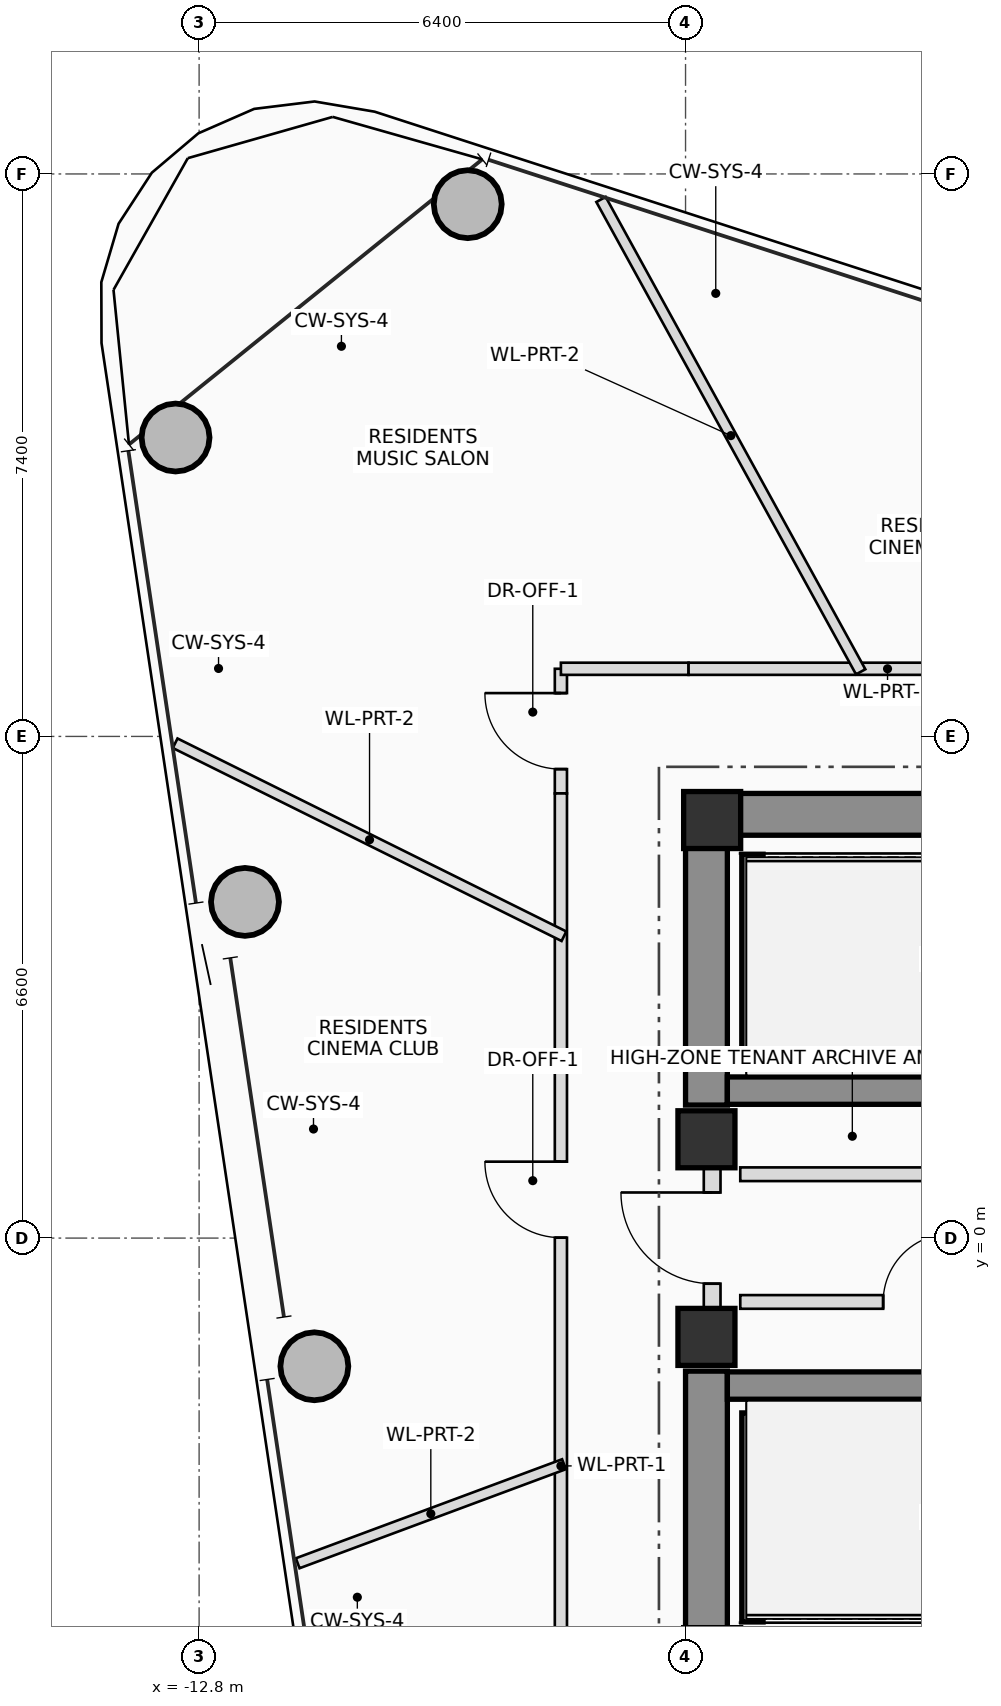
"""IFC4 building model, lengths in metres.
Left out: names, types, materials, properties, quantities, classifications, styles, units other than length and angle.
Written with IfcOpenShell. Run it as: python <this file> out.ifc"""

import sys

from ifc_helpers import new_model, si_unit, direction, frame, frame_2d, origin, origin_2d, place, context, subcontext, project, spatial, rectangle, hollow_circle, extrude, source, transform, mapped, element, fill, save


model = new_model("IFC4")
c1 = context("Model", 3, precision=1e-05, world=origin(), true_north=direction((0.0, 1.0)))
c2 = subcontext(c1, "Body", "Model", "MODEL_VIEW")
j1 = project(units=[si_unit("LENGTHUNIT", "METRE"), si_unit("PLANEANGLEUNIT", "RADIAN")], contexts=[c1])
p1 = place(None, origin())
s1 = spatial("IfcSite", under=j1, at=p1, CompositionType="ELEMENT")
p2 = place(p1, origin())
s2 = spatial("IfcBuilding", under=s1, at=p2, CompositionType="ELEMENT")
p3 = place(p2, frame((0.0, 0.0, 274.55)))
s3 = spatial("IfcBuildingStorey", under=s2, at=p3, CompositionType="ELEMENT", Elevation=274.55)
m1 = source(origin(), c2, "Body", "SweptSolid", [
    extrude(rectangle(XDim=0.75, YDim=0.75, at=origin_2d()), origin(), (0.0, 0.0, 1.0), 3.4),
])
p4 = place(p3, frame((-6.05, 5.5, 0.0), z_axis=(0.0, 0.0, 1.0), x_axis=(1.0, 0.0, 0.0)))
e1 = element("IfcColumn", 1, at=p4, inside=s3, PredefinedType="COLUMN", context=c2, shape_type="MappedRepresentation", body=[
    mapped(m1, transform((0.0, 0.0, 0.0), scale=1.0)),
])
p5 = place(p3, frame((-6.4, 5.575, 0.0), z_axis=(0.0, 0.0, 1.0), x_axis=(1.0, 0.0, 0.0)))
e2 = element("IfcWall", 2, at=p5, inside=s3, PredefinedType="SHEAR", context=c2, shape_type="SweptSolid", body=[
    extrude(rectangle(XDim=12.8, YDim=0.55, at=frame_2d((6.4, 0.0))), origin(), (0.0, 0.0, 1.0), 3.4),
])
p6 = place(p5, frame((8.6, 0.0, 0.0)))
e3 = element("IfcOpeningElement", 3, at=p6, cuts=e2, PredefinedType="OPENING", context=c2, shape_type="SweptSolid", body=[
    extrude(rectangle(XDim=1.2, YDim=2.2, at=frame_2d((0.6, 1.1))), frame((0.0, 0.285, 0.0), z_axis=(0.0, -1.0, 0.0), x_axis=(1.0, 0.0, 0.0)), (0.0, 0.0, 1.0), 0.57),
])
for number, where, z_axis, x_axis in (
    (4, (-6.125, -5.3, 0.0), (0.0, 0.0, 1.0), (0.0, 1.0, 0.0)),
    (5, (-6.125, 1.75, 0.0), (0.0, 0.0, 1.0), (0.0, 1.0, 0.0)),
):
    element("IfcWall", number, at=place(p3, frame(where, z_axis=z_axis, x_axis=x_axis)), inside=s3, PredefinedType="SHEAR", context=c2, shape_type="SweptSolid", body=[
        extrude(rectangle(XDim=3.55, YDim=0.55, at=frame_2d((1.775, 0.0))), origin(), (0.0, 0.0, 1.0), 3.4),
    ])
for number, where, z_axis, x_axis in (
    (6, (-5.85, 1.94, 0.0), (0.0, 0.0, 1.0), (1.0, 0.0, 0.0)),
    (7, (-5.85, -1.94, 0.0), (0.0, 0.0, 1.0), (1.0, 0.0, 0.0)),
):
    element("IfcWall", number, at=place(p3, frame(where, z_axis=z_axis, x_axis=x_axis)), inside=s3, PredefinedType="SHEAR", context=c2, shape_type="SweptSolid", body=[
        extrude(rectangle(XDim=11.7, YDim=0.36, at=frame_2d((5.85, 0.0))), origin(), (0.0, 0.0, 1.0), 3.4),
    ])
for number, where, z_axis, x_axis in (
    (8, (-5.52, 2.3, 0.0), (0.0, 0.0, 1.0), (0.0, 1.0, 0.0)),
    (9, (-5.52, -5.05, 0.0), (0.0, 0.0, 1.0), (0.0, 1.0, 0.0)),
):
    element("IfcWall", number, at=place(p3, frame(where, z_axis=z_axis, x_axis=x_axis)), inside=s3, PredefinedType="SHEAR", context=c2, shape_type="SweptSolid", body=[
        extrude(rectangle(XDim=2.75, YDim=0.28, at=frame_2d((1.375, 0.0))), origin(), (0.0, 0.0, 1.0), 3.4),
    ])
for number, where, z_axis, x_axis in (
    (10, (-6.125, -1.3, 0.0), (0.0, 0.0, 1.0), (1.0, 0.0, 0.0)),
    (11, (-6.125, 1.3, 0.0), (0.0, 0.0, 1.0), (1.0, 0.0, 0.0)),
):
    element("IfcColumn", number, at=place(p3, frame(where, z_axis=z_axis, x_axis=x_axis)), inside=s3, PredefinedType="COLUMN", context=c2, shape_type="MappedRepresentation", body=[
        mapped(m1, transform((0.0, 0.0, 0.0), scale=1.0)),
    ])
m2 = source(origin(), c2, "Body", "SweptSolid", [
    extrude(hollow_circle(Radius=0.45, WallThickness=0.032, at=origin_2d()), origin(), (0.0, 0.0, 1.0), 3.4),
])
for number, where, z_axis, x_axis in (
    (12, (-9.266, 13.602, 0.0), (0.0, 0.0, 1.0), (1.0, 0.0, 0.0)),
    (13, (-13.11, 10.532, 0.0), (0.0, 0.0, 1.0), (1.0, 0.0, 0.0)),
    (14, (-12.197, 4.423, 0.0), (0.0, 0.0, 1.0), (1.0, 0.0, 0.0)),
    (15, (-11.284, -1.686, 0.0), (0.0, 0.0, 1.0), (1.0, 0.0, 0.0)),
):
    element("IfcColumn", number, at=place(p3, frame(where, z_axis=z_axis, x_axis=x_axis)), inside=s3, PredefinedType="COLUMN", context=c2, shape_type="MappedRepresentation", body=[
        mapped(m2, transform((0.0, 0.0, 0.0), scale=1.0)),
    ])
p7 = place(p3, frame((-6.05, -0.95, 0.0), z_axis=(0.0, 0.0, 1.0), x_axis=(0.0, 1.0, 0.0)))
e16 = element("IfcWall", 16, at=p7, inside=s3, PredefinedType="PLUMBINGWALL", context=c2, shape_type="SweptSolid", body=[
    extrude(rectangle(XDim=1.9, YDim=0.22, at=frame_2d((0.95, 0.0))), origin(), (0.0, 0.0, 1.0), 2.18),
])
p8 = place(p7, frame((0.35, 0.0, 0.0)))
e17 = element("IfcOpeningElement", 17, at=p8, cuts=e16, PredefinedType="OPENING", context=c2, shape_type="SweptSolid", body=[
    extrude(rectangle(XDim=1.2, YDim=2.2, at=frame_2d((0.6, 1.1))), frame((0.0, 0.12, 0.0), z_axis=(0.0, -1.0, 0.0), x_axis=(1.0, 0.0, 0.0)), (0.0, 0.0, 1.0), 0.24),
])
p9 = place(p3, frame((-5.68, 0.84, 0.0), z_axis=(0.0, 0.0, 1.0), x_axis=(1.0, 0.0, 0.0)))
e18 = element("IfcWall", 18, at=p9, inside=s3, PredefinedType="PLUMBINGWALL", context=c2, shape_type="SweptSolid", body=[
    extrude(rectangle(XDim=11.33, YDim=0.18, at=frame_2d((5.665, 0.0))), origin(), (0.0, 0.0, 1.0), 3.2),
])
p10 = place(p9, frame((3.13, 0.0, 0.0)))
e19 = element("IfcOpeningElement", 19, at=p10, cuts=e18, PredefinedType="OPENING", context=c2, shape_type="SweptSolid", body=[
    extrude(rectangle(XDim=0.9, YDim=2.05, at=frame_2d((0.45, 1.025))), frame((0.0, 0.1, 0.0), z_axis=(0.0, -1.0, 0.0), x_axis=(1.0, 0.0, 0.0)), (0.0, 0.0, 1.0), 0.2),
])
p11 = place(p9, frame((7.33, 0.0, 0.0)))
e20 = element("IfcOpeningElement", 20, at=p11, cuts=e18, PredefinedType="OPENING", context=c2, shape_type="SweptSolid", body=[
    extrude(rectangle(XDim=1.1, YDim=2.2, at=frame_2d((0.55, 1.1))), frame((0.0, 0.1, 0.0), z_axis=(0.0, -1.0, 0.0), x_axis=(1.0, 0.0, 0.0)), (0.0, 0.0, 1.0), 0.2),
])
p12 = place(p9, frame((8.83, 0.0, 0.0)))
e21 = element("IfcOpeningElement", 21, at=p12, cuts=e18, PredefinedType="OPENING", context=c2, shape_type="SweptSolid", body=[
    extrude(rectangle(XDim=1.1, YDim=2.2, at=frame_2d((0.55, 1.1))), frame((0.0, 0.1, 0.0), z_axis=(0.0, -1.0, 0.0), x_axis=(1.0, 0.0, 0.0)), (0.0, 0.0, 1.0), 0.2),
])
p13 = place(p3, frame((-5.68, -0.84, 0.0), z_axis=(0.0, 0.0, 1.0), x_axis=(1.0, 0.0, 0.0)))
e22 = element("IfcWall", 22, at=p13, inside=s3, PredefinedType="PLUMBINGWALL", context=c2, shape_type="SweptSolid", body=[
    extrude(rectangle(XDim=10.22, YDim=0.18, at=frame_2d((5.11, 0.0))), origin(), (0.0, 0.0, 1.0), 3.2),
])
p14 = place(p13, frame((1.88, 0.0, 0.0)))
e23 = element("IfcOpeningElement", 23, at=p14, cuts=e22, PredefinedType="OPENING", context=c2, shape_type="SweptSolid", body=[
    extrude(rectangle(XDim=0.9, YDim=2.05, at=frame_2d((0.45, 1.025))), frame((0.0, 0.1, 0.0), z_axis=(0.0, -1.0, 0.0), x_axis=(1.0, 0.0, 0.0)), (0.0, 0.0, 1.0), 0.2),
])
p15 = place(p13, frame((5.35, 0.0, 0.0)))
e24 = element("IfcOpeningElement", 24, at=p15, cuts=e22, PredefinedType="OPENING", context=c2, shape_type="SweptSolid", body=[
    extrude(rectangle(XDim=0.9, YDim=2.05, at=frame_2d((0.45, 1.025))), frame((0.0, 0.1, 0.0), z_axis=(0.0, -1.0, 0.0), x_axis=(1.0, 0.0, 0.0)), (0.0, 0.0, 1.0), 0.2),
])
p16 = place(p13, frame((7.33, 0.0, 0.0)))
e25 = element("IfcOpeningElement", 25, at=p16, cuts=e22, PredefinedType="OPENING", context=c2, shape_type="SweptSolid", body=[
    extrude(rectangle(XDim=1.1, YDim=2.2, at=frame_2d((0.55, 1.1))), frame((0.0, 0.1, 0.0), z_axis=(0.0, -1.0, 0.0), x_axis=(1.0, 0.0, 0.0)), (0.0, 0.0, 1.0), 0.2),
])
p17 = place(p13, frame((9.02, 0.0, 0.0)))
e26 = element("IfcOpeningElement", 26, at=p17, cuts=e22, PredefinedType="OPENING", context=c2, shape_type="SweptSolid", body=[
    extrude(rectangle(XDim=0.9, YDim=2.05, at=frame_2d((0.45, 1.025))), frame((0.0, 0.1, 0.0), z_axis=(0.0, -1.0, 0.0), x_axis=(1.0, 0.0, 0.0)), (0.0, 0.0, 1.0), 0.2),
])
p18 = place(p3, frame((-8.04, 5.85, 0.0), z_axis=(0.0, 0.0, 1.0), x_axis=(0.0, 1.0, 0.0)))
e27 = element("IfcWall", 27, at=p18, inside=s3, PredefinedType="PARTITIONING", context=c2, shape_type="SweptSolid", body=[
    extrude(rectangle(XDim=1.64, YDim=0.16, at=frame_2d((0.82, 0.0))), origin(), (0.0, 0.0, 1.0), 2.605),
])
p19 = place(p18, frame((0.32, 0.0, 0.0)))
e28 = element("IfcOpeningElement", 28, at=p19, cuts=e27, PredefinedType="OPENING", context=c2, shape_type="SweptSolid", body=[
    extrude(rectangle(XDim=1.0, YDim=2.25, at=frame_2d((0.5, 1.125))), frame((0.0, 0.09, 0.0), z_axis=(0.0, -1.0, 0.0), x_axis=(1.0, 0.0, 0.0)), (0.0, 0.0, 1.0), 0.18),
])
p20 = place(p3, frame((-8.04, 7.49, 0.0), z_axis=(0.0, 0.0, 1.0), x_axis=(1.0, 0.0, 0.0)))
e29 = element("IfcWall", 29, at=p20, inside=s3, PredefinedType="PARTITIONING", context=c2, shape_type="SweptSolid", body=[
    extrude(rectangle(XDim=1.68, YDim=0.16, at=frame_2d((0.84, 0.0))), origin(), (0.0, 0.0, 1.0), 2.605),
])
p21 = place(p3, frame((-6.36, 7.49, 0.0), z_axis=(0.0, 0.0, 1.0), x_axis=(1.0, 0.0, 0.0)))
e30 = element("IfcWall", 30, at=p21, inside=s3, PredefinedType="PARTITIONING", context=c2, shape_type="SweptSolid", body=[
    extrude(rectangle(XDim=9.81, YDim=0.16, at=frame_2d((4.905, 0.0))), origin(), (0.0, 0.0, 1.0), 2.605),
])
p22 = place(p21, frame((5.385, 0.0, 0.0)))
e31 = element("IfcOpeningElement", 31, at=p22, cuts=e30, PredefinedType="OPENING", context=c2, shape_type="SweptSolid", body=[
    extrude(rectangle(XDim=1.0, YDim=2.25, at=frame_2d((0.5, 1.125))), frame((0.0, 0.09, 0.0), z_axis=(0.0, -1.0, 0.0), x_axis=(1.0, 0.0, 0.0)), (0.0, 0.0, 1.0), 0.18),
])
p23 = place(p3, frame((-8.04, -5.85, 0.0), z_axis=(0.0, 0.0, 1.0), x_axis=(0.0, 1.0, 0.0)))
e32 = element("IfcWall", 32, at=p23, inside=s3, PredefinedType="PARTITIONING", context=c2, shape_type="SweptSolid", body=[
    extrude(rectangle(XDim=11.7, YDim=0.16, at=frame_2d((5.85, 0.0))), origin(), (0.0, 0.0, 1.0), 2.605),
])
p24 = place(p23, frame((5.855, 0.0, 0.0)))
e33 = element("IfcOpeningElement", 33, at=p24, cuts=e32, PredefinedType="OPENING", context=c2, shape_type="SweptSolid", body=[
    extrude(rectangle(XDim=1.0, YDim=2.25, at=frame_2d((0.5, 1.125))), frame((0.0, 0.09, 0.0), z_axis=(0.0, -1.0, 0.0), x_axis=(1.0, 0.0, 0.0)), (0.0, 0.0, 1.0), 0.18),
])
p25 = place(p3, frame((-4.096, 7.45, 0.0), z_axis=(0.0, 0.0, 1.0), x_axis=(-0.481753550604, 0.876306747937, 0.0)))
e34 = element("IfcWall", 34, at=p25, inside=s3, PredefinedType="PARTITIONING", context=c2, shape_type="SweptSolid", body=[
    extrude(rectangle(XDim=7.092, YDim=0.14, at=frame_2d((3.546, 0.0))), origin(), (0.0, 0.0, 1.0), 2.605),
])
p26 = place(p3, frame((-8.0, 3.971, 0.0), z_axis=(0.0, 0.0, 1.0), x_axis=(-0.895714476241, 0.444629707793, 0.0)))
e35 = element("IfcWall", 35, at=p26, inside=s3, PredefinedType="PARTITIONING", context=c2, shape_type="SweptSolid", body=[
    extrude(rectangle(XDim=5.711, YDim=0.14, at=frame_2d((2.855, 0.0))), origin(), (0.0, 0.0, 1.0), 2.605),
])
p27 = place(p3, frame((-8.0, -2.975, 0.0), z_axis=(0.0, 0.0, 1.0), x_axis=(-0.937281421119, -0.348573575627, 0.0)))
e36 = element("IfcWall", 36, at=p27, inside=s3, PredefinedType="PARTITIONING", context=c2, shape_type="SweptSolid", body=[
    extrude(rectangle(XDim=3.737, YDim=0.14, at=frame_2d((1.869, 0.0))), origin(), (0.0, 0.0, 1.0), 2.605),
])
p28 = place(p8, origin())
e37 = element("IfcDoor", 37, at=p28, inside=s3, OperationType="SINGLE_SWING_RIGHT", PredefinedType="DOOR", context=c2, shape_type="SweptSolid", body=[
    extrude(rectangle(XDim=1.2, YDim=2.2, at=frame_2d((0.6, 1.1))), frame((0.0, 0.025, 0.0), z_axis=(0.0, -1.0, 0.0), x_axis=(1.0, 0.0, 0.0)), (0.0, 0.0, 1.0), 0.05),
])
fill(e17, e37)
p29 = place(p14, origin())
e38 = element("IfcDoor", 38, at=p29, inside=s3, OperationType="SINGLE_SWING_RIGHT", PredefinedType="DOOR", context=c2, shape_type="SweptSolid", body=[
    extrude(rectangle(XDim=0.9, YDim=2.05, at=frame_2d((0.45, 1.025))), frame((0.0, 0.025, 0.0), z_axis=(0.0, -1.0, 0.0), x_axis=(1.0, 0.0, 0.0)), (0.0, 0.0, 1.0), 0.05),
])
fill(e23, e38)
p30 = place(p19, origin())
e39 = element("IfcDoor", 39, at=p30, inside=s3, OperationType="SINGLE_SWING_RIGHT", PredefinedType="DOOR", context=c2, shape_type="SweptSolid", body=[
    extrude(rectangle(XDim=1.0, YDim=2.25, at=frame_2d((0.5, 1.125))), frame((0.0, 0.025, 0.0), z_axis=(0.0, -1.0, 0.0), x_axis=(1.0, 0.0, 0.0)), (0.0, 0.0, 1.0), 0.05),
])
fill(e28, e39)
p31 = place(p24, origin())
e40 = element("IfcDoor", 40, at=p31, inside=s3, OperationType="SINGLE_SWING_RIGHT", PredefinedType="DOOR", context=c2, shape_type="SweptSolid", body=[
    extrude(rectangle(XDim=1.0, YDim=2.25, at=frame_2d((0.5, 1.125))), frame((0.0, 0.025, 0.0), z_axis=(0.0, -1.0, 0.0), x_axis=(1.0, 0.0, 0.0)), (0.0, 0.0, 1.0), 0.05),
])
fill(e33, e40)
save(model, sys.argv[1])
